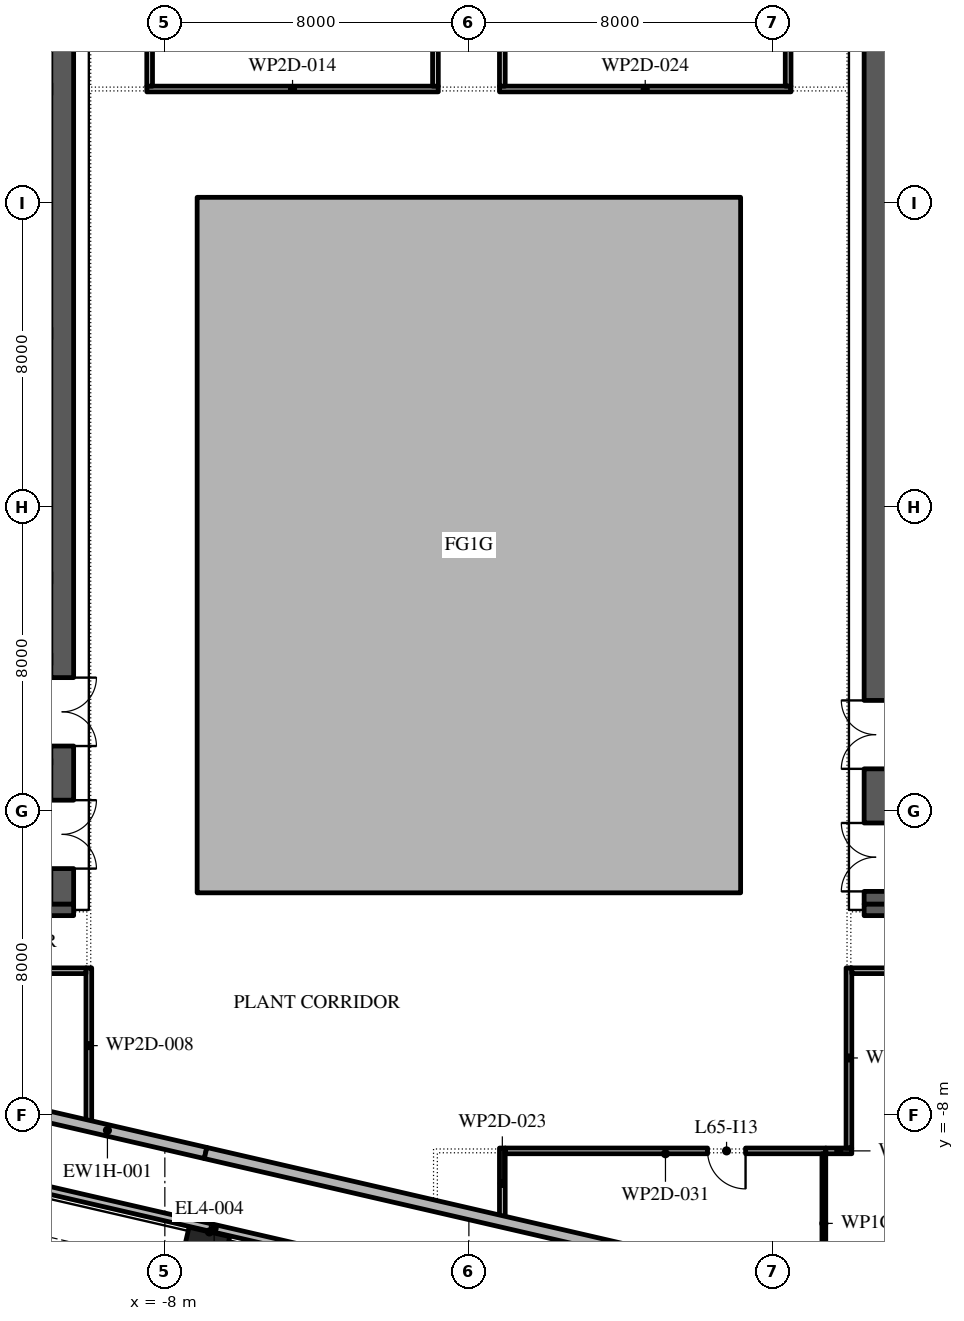
"""IFC4 building model, lengths in metres.
Left out: names, types, materials, properties, quantities, classifications, styles, units other than length and angle.
Written with IfcOpenShell. Run it as: python <this file> out.ifc"""

import sys

from ifc_helpers import new_model, si_unit, direction, frame, frame_2d, origin, origin_2d, place, context, subcontext, project, spatial, polyline, rectangle, outline, extrude, element, fill, save


model = new_model("IFC4")
c1 = context("Model", 3, precision=1e-05, world=origin(), true_north=direction((0.0, 1.0)))
c2 = subcontext(c1, "Body", "Model", "MODEL_VIEW")
j1 = project(units=[si_unit("LENGTHUNIT", "METRE"), si_unit("PLANEANGLEUNIT", "RADIAN")], contexts=[c1])
p1 = place(None, origin())
s1 = spatial("IfcSite", under=j1, at=p1, CompositionType="ELEMENT")
p2 = place(p1, origin())
s2 = spatial("IfcBuilding", under=s1, at=p2, CompositionType="ELEMENT")
p3 = place(p2, frame((0.0, 0.0, 297.6)))
s3 = spatial("IfcBuildingStorey", under=s2, at=p3, CompositionType="ELEMENT", Elevation=297.6)
p4 = place(p3, frame((-6.951, -11.608, 0.0), z_axis=(0.0, 0.0, 1.0), x_axis=(0.974370064785, -0.224951054344, 0.0)))
e1 = element("IfcColumn", 1, at=p4, inside=s3, PredefinedType="COLUMN", context=c2, shape_type="SweptSolid", body=[
    extrude(rectangle(XDim=1.1, YDim=1.1, at=origin_2d()), origin(), (0.0, 0.0, 1.0), 5.4),
])
p5 = place(p3, origin())
e2 = element("IfcWall", 2, at=p5, inside=s3, PredefinedType="STANDARD", context=c2, shape_type="SweptSolid", body=[
    extrude(outline(polyline([(-7.15, -2.15), (7.15, -2.15), (7.15, 16.15), (-7.15, 16.15), (-7.15, -2.15)]), holes=[polyline([(-7.0, -2.0), (-7.0, 16.0), (7.0, 16.0), (7.0, -2.0), (-7.0, -2.0)])]), origin(), (0.0, 0.0, 1.0), 4.95),
])
p6 = place(p3, frame((-31.919, -5.156, -0.05), z_axis=(0.0, 0.0, 1.0), x_axis=(0.974370681559, -0.224948382787, 0.0)))
e3 = element("IfcWall", 3, at=p6, inside=s3, PredefinedType="STANDARD", context=c2, shape_type="SweptSolid", body=[
    extrude(rectangle(XDim=51.76, YDim=0.2, at=frame_2d((25.88, 0.0))), origin(), (0.0, 0.0, 1.0), 1.1),
])
p7 = place(p3, frame((-10.7, -2.45, 0.0), z_axis=(0.0, 0.0, 1.0), x_axis=(0.0, 1.0, 0.0)))
e4 = element("IfcWall", 4, at=p7, inside=s3, PredefinedType="SHEAR", context=c2, shape_type="SweptSolid", body=[
    extrude(rectangle(XDim=27.9, YDim=0.6, at=frame_2d((13.95, 0.0))), origin(), (0.0, 0.0, 1.0), 4.95),
])
p8 = place(p7, frame((23.65, 0.0, 0.0)))
e5 = element("IfcOpeningElement", 5, at=p8, cuts=e4, PredefinedType="OPENING", context=c2, shape_type="SweptSolid", body=[
    extrude(rectangle(XDim=2.4, YDim=2.1, at=frame_2d((1.2, 1.05))), frame((0.0, 0.31, 0.0), z_axis=(0.0, -1.0, 0.0), x_axis=(1.0, 0.0, 0.0)), (0.0, 0.0, 1.0), 0.62),
])
p9 = place(p7, frame((0.938, 0.0, 0.0)))
e6 = element("IfcOpeningElement", 6, at=p9, cuts=e4, PredefinedType="OPENING", context=c2, shape_type="SweptSolid", body=[
    extrude(rectangle(XDim=1.8, YDim=2.4, at=frame_2d((0.9, 1.2))), frame((0.0, 0.31, 0.0), z_axis=(0.0, -1.0, 0.0), x_axis=(1.0, 0.0, 0.0)), (0.0, 0.0, 1.0), 0.62),
])
p10 = place(p7, frame((4.163, 0.0, 0.0)))
e7 = element("IfcOpeningElement", 7, at=p10, cuts=e4, PredefinedType="OPENING", context=c2, shape_type="SweptSolid", body=[
    extrude(rectangle(XDim=1.8, YDim=2.4, at=frame_2d((0.9, 1.2))), frame((0.0, 0.31, 0.0), z_axis=(0.0, -1.0, 0.0), x_axis=(1.0, 0.0, 0.0)), (0.0, 0.0, 1.0), 0.62),
])
p11 = place(p3, frame((-21.6, -2.6, 0.0), z_axis=(0.0, 0.0, 1.0), x_axis=(1.0, 0.0, 0.0)))
e8 = element("IfcWall", 8, at=p11, inside=s3, PredefinedType="SHEAR", context=c2, shape_type="SweptSolid", body=[
    extrude(rectangle(XDim=11.2, YDim=0.3, at=frame_2d((5.6, 0.0))), origin(), (0.0, 0.0, 1.0), 4.95),
])
p12 = place(p3, frame((10.7, -2.45, 0.0), z_axis=(0.0, 0.0, 1.0), x_axis=(0.0, 1.0, 0.0)))
e9 = element("IfcWall", 9, at=p12, inside=s3, PredefinedType="SHEAR", context=c2, shape_type="SweptSolid", body=[
    extrude(rectangle(XDim=27.9, YDim=0.6, at=frame_2d((13.95, 0.0))), origin(), (0.0, 0.0, 1.0), 4.95),
])
p13 = place(p12, frame((23.65, 0.0, 0.0)))
e10 = element("IfcOpeningElement", 10, at=p13, cuts=e9, PredefinedType="OPENING", context=c2, shape_type="SweptSolid", body=[
    extrude(rectangle(XDim=2.4, YDim=2.1, at=frame_2d((1.2, 1.05))), frame((0.0, 0.31, 0.0), z_axis=(0.0, -1.0, 0.0), x_axis=(1.0, 0.0, 0.0)), (0.0, 0.0, 1.0), 0.62),
])
p14 = place(p12, frame((0.337, 0.0, 0.0)))
e11 = element("IfcOpeningElement", 11, at=p14, cuts=e9, PredefinedType="OPENING", context=c2, shape_type="SweptSolid", body=[
    extrude(rectangle(XDim=1.8, YDim=2.4, at=frame_2d((0.9, 1.2))), frame((0.0, 0.31, 0.0), z_axis=(0.0, -1.0, 0.0), x_axis=(1.0, 0.0, 0.0)), (0.0, 0.0, 1.0), 0.62),
])
p15 = place(p12, frame((3.562, 0.0, 0.0)))
e12 = element("IfcOpeningElement", 12, at=p15, cuts=e9, PredefinedType="OPENING", context=c2, shape_type="SweptSolid", body=[
    extrude(rectangle(XDim=1.8, YDim=2.4, at=frame_2d((0.9, 1.2))), frame((0.0, 0.31, 0.0), z_axis=(0.0, -1.0, 0.0), x_axis=(1.0, 0.0, 0.0)), (0.0, 0.0, 1.0), 0.62),
])
p16 = place(p3, frame((10.4, -2.6, 0.0), z_axis=(0.0, 0.0, 1.0), x_axis=(1.0, 0.0, 0.0)))
e13 = element("IfcWall", 13, at=p16, inside=s3, PredefinedType="SHEAR", context=c2, shape_type="SweptSolid", body=[
    extrude(rectangle(XDim=11.2, YDim=0.3, at=frame_2d((5.6, 0.0))), origin(), (0.0, 0.0, 1.0), 4.95),
])
p17 = place(p3, frame((-10.0, -8.216, 0.0), z_axis=(0.0, 0.0, 1.0), x_axis=(0.0, 1.0, 0.0)))
e14 = element("IfcWall", 14, at=p17, inside=s3, PredefinedType="PARTITIONING", context=c2, shape_type="SweptSolid", body=[
    extrude(rectangle(XDim=4.091, YDim=0.15, at=frame_2d((2.045, 0.0))), origin(), (0.0, 0.0, 1.0), 4.95),
])
p18 = place(p3, frame((-10.075, -4.2, 0.0), z_axis=(0.0, 0.0, 1.0), x_axis=(-1.0, 0.0, 0.0)))
e15 = element("IfcWall", 15, at=p18, inside=s3, PredefinedType="PARTITIONING", context=c2, shape_type="SweptSolid", body=[
    extrude(rectangle(XDim=13.45, YDim=0.15, at=frame_2d((6.725, 0.0))), origin(), (0.0, 0.0, 1.0), 4.95),
])
p19 = place(p18, frame((7.625, 0.0, 0.0)))
e16 = element("IfcOpeningElement", 16, at=p19, cuts=e15, PredefinedType="OPENING", context=c2, shape_type="SweptSolid", body=[
    extrude(rectangle(XDim=1.0, YDim=2.1, at=frame_2d((0.5, 1.05))), frame((0.0, 0.085, 0.0), z_axis=(0.0, -1.0, 0.0), x_axis=(1.0, 0.0, 0.0)), (0.0, 0.0, 1.0), 0.17),
])
p20 = place(p3, frame((-8.475, 19.0, 0.0), z_axis=(0.0, 0.0, 1.0), x_axis=(1.0, 0.0, 0.0)))
e17 = element("IfcWall", 17, at=p20, inside=s3, PredefinedType="PARTITIONING", context=c2, shape_type="SweptSolid", body=[
    extrude(rectangle(XDim=7.67, YDim=0.15, at=frame_2d((3.835, 0.0))), origin(), (0.0, 0.0, 1.0), 4.95),
])
p21 = place(p3, frame((-8.4, 29.95, 0.0), z_axis=(0.0, 0.0, 1.0), x_axis=(0.0, -1.0, 0.0)))
e18 = element("IfcWall", 18, at=p21, inside=s3, PredefinedType="PARTITIONING", context=c2, shape_type="SweptSolid", body=[
    extrude(rectangle(XDim=10.875, YDim=0.15, at=frame_2d((5.438, 0.0))), origin(), (0.0, 0.0, 1.0), 4.95),
])
p22 = place(p21, frame((5.05, 0.0, 0.0)))
e19 = element("IfcOpeningElement", 19, at=p22, cuts=e18, PredefinedType="OPENING", context=c2, shape_type="SweptSolid", body=[
    extrude(rectangle(XDim=1.0, YDim=2.1, at=frame_2d((0.5, 1.05))), frame((0.0, 0.085, 0.0), z_axis=(0.0, -1.0, 0.0), x_axis=(1.0, 0.0, 0.0)), (0.0, 0.0, 1.0), 0.17),
])
p23 = place(p3, frame((-0.88, 19.075, 0.0), z_axis=(0.0, 0.0, 1.0), x_axis=(0.0, 1.0, 0.0)))
e20 = element("IfcWall", 20, at=p23, inside=s3, PredefinedType="PARTITIONING", context=c2, shape_type="SweptSolid", body=[
    extrude(rectangle(XDim=10.925, YDim=0.15, at=frame_2d((5.462, 0.0))), origin(), (0.0, 0.0, 1.0), 4.95),
])
p24 = place(p3, frame((0.88, -8.865, 0.0), z_axis=(0.0, 0.0, 1.0), x_axis=(0.0, -1.0, 0.0)))
e21 = element("IfcWall", 21, at=p24, inside=s3, PredefinedType="PARTITIONING", context=c2, shape_type="SweptSolid", body=[
    extrude(rectangle(XDim=1.863, YDim=0.15, at=frame_2d((0.932, 0.0))), origin(), (0.0, 0.0, 1.0), 4.95),
])
p25 = place(p3, frame((0.805, 19.0, 0.0), z_axis=(0.0, 0.0, 1.0), x_axis=(1.0, 0.0, 0.0)))
e22 = element("IfcWall", 22, at=p25, inside=s3, PredefinedType="PARTITIONING", context=c2, shape_type="SweptSolid", body=[
    extrude(rectangle(XDim=7.67, YDim=0.15, at=frame_2d((3.835, 0.0))), origin(), (0.0, 0.0, 1.0), 4.95),
])
p26 = place(p3, frame((0.88, 28.14, 0.0), z_axis=(0.0, 0.0, 1.0), x_axis=(0.0, -1.0, 0.0)))
e23 = element("IfcWall", 23, at=p26, inside=s3, PredefinedType="PARTITIONING", context=c2, shape_type="SweptSolid", body=[
    extrude(rectangle(XDim=9.065, YDim=0.15, at=frame_2d((4.532, 0.0))), origin(), (0.0, 0.0, 1.0), 4.95),
])
p27 = place(p3, frame((8.4, 19.075, 0.0), z_axis=(0.0, 0.0, 1.0), x_axis=(0.0, 1.0, 0.0)))
e24 = element("IfcWall", 24, at=p27, inside=s3, PredefinedType="PARTITIONING", context=c2, shape_type="SweptSolid", body=[
    extrude(rectangle(XDim=9.015, YDim=0.15, at=frame_2d((4.508, 0.0))), origin(), (0.0, 0.0, 1.0), 4.95),
])
p28 = place(p27, frame((5.915, 0.0, 0.0)))
e25 = element("IfcOpeningElement", 25, at=p28, cuts=e24, PredefinedType="OPENING", context=c2, shape_type="SweptSolid", body=[
    extrude(rectangle(XDim=1.0, YDim=2.1, at=frame_2d((0.5, 1.05))), frame((0.0, 0.085, 0.0), z_axis=(0.0, -1.0, 0.0), x_axis=(1.0, 0.0, 0.0)), (0.0, 0.0, 1.0), 0.17),
])
p29 = place(p3, frame((9.39, -8.94, 0.0), z_axis=(0.0, 0.0, 1.0), x_axis=(-1.0, 0.0, 0.0)))
e26 = element("IfcWall", 26, at=p29, inside=s3, PredefinedType="PARTITIONING", context=c2, shape_type="SweptSolid", body=[
    extrude(rectangle(XDim=8.435, YDim=0.15, at=frame_2d((4.217, 0.0))), origin(), (0.0, 0.0, 1.0), 4.95),
])
p30 = place(p29, frame((2.11, 0.0, 0.0)))
e27 = element("IfcOpeningElement", 27, at=p30, cuts=e26, PredefinedType="OPENING", context=c2, shape_type="SweptSolid", body=[
    extrude(rectangle(XDim=1.0, YDim=2.1, at=frame_2d((0.5, 1.05))), frame((0.0, 0.085, 0.0), z_axis=(0.0, -1.0, 0.0), x_axis=(1.0, 0.0, 0.0)), (0.0, 0.0, 1.0), 0.17),
])
p31 = place(p3, frame((9.34, -9.015, 0.0), z_axis=(0.0, 0.0, 1.0), x_axis=(0.0, -1.0, 0.0)))
e28 = element("IfcWall", 28, at=p31, inside=s3, PredefinedType="PARTITIONING", context=c2, shape_type="SweptSolid", body=[
    extrude(rectangle(XDim=3.666, YDim=0.1, at=frame_2d((1.833, 0.0))), origin(), (0.0, 0.0, 1.0), 4.95),
])
p32 = place(p3, frame((10.075, -8.94, 0.0), z_axis=(0.0, 0.0, 1.0), x_axis=(-1.0, 0.0, 0.0)))
e29 = element("IfcWall", 29, at=p32, inside=s3, PredefinedType="PARTITIONING", context=c2, shape_type="SweptSolid", body=[
    extrude(rectangle(XDim=0.685, YDim=0.15, at=frame_2d((0.343, 0.0))), origin(), (0.0, 0.0, 1.0), 4.95),
])
p33 = place(p3, frame((10.0, -4.125, 0.0), z_axis=(0.0, 0.0, 1.0), x_axis=(0.0, -1.0, 0.0)))
e30 = element("IfcWall", 30, at=p33, inside=s3, PredefinedType="PARTITIONING", context=c2, shape_type="SweptSolid", body=[
    extrude(rectangle(XDim=4.74, YDim=0.15, at=frame_2d((2.37, 0.0))), origin(), (0.0, 0.0, 1.0), 4.95),
])
p34 = place(p3, frame((23.014, -4.2, 0.0), z_axis=(0.0, 0.0, 1.0), x_axis=(-1.0, 0.0, 0.0)))
e31 = element("IfcWall", 31, at=p34, inside=s3, PredefinedType="PARTITIONING", context=c2, shape_type="SweptSolid", body=[
    extrude(rectangle(XDim=12.939, YDim=0.15, at=frame_2d((6.469, 0.0))), origin(), (0.0, 0.0, 1.0), 4.95),
])
p35 = place(p34, frame((7.114, 0.0, 0.0)))
e32 = element("IfcOpeningElement", 32, at=p35, cuts=e31, PredefinedType="OPENING", context=c2, shape_type="SweptSolid", body=[
    extrude(rectangle(XDim=1.0, YDim=2.1, at=frame_2d((0.5, 1.05))), frame((0.0, 0.085, 0.0), z_axis=(0.0, -1.0, 0.0), x_axis=(1.0, 0.0, 0.0)), (0.0, 0.0, 1.0), 0.17),
])
p36 = place(p3, frame((-12.093, -7.804, 0.0), z_axis=(0.0, 0.0, 1.0), x_axis=(0.974367901354, -0.224960424989, 0.0)))
e33 = element("IfcWall", 33, at=p36, inside=s3, PredefinedType="STANDARD", context=c2, shape_type="SweptSolid", body=[
    extrude(rectangle(XDim=5.3, YDim=0.3, at=frame_2d((2.65, 0.0))), origin(), (0.0, 0.0, 1.0), 4.05),
])
p37 = place(p3, frame((-6.928, -8.996, 0.0), z_axis=(0.0, 0.0, 1.0), x_axis=(0.974370214698, -0.224950404997, 0.0)))
e34 = element("IfcWall", 34, at=p37, inside=s3, PredefinedType="STANDARD", context=c2, shape_type="SweptSolid", body=[
    extrude(rectangle(XDim=24.716, YDim=0.3, at=frame_2d((12.358, 0.0))), origin(), (0.0, 0.0, 1.0), 4.95),
])
p38 = place(p30, origin())
e35 = element("IfcDoor", 35, at=p38, inside=s3, OperationType="SINGLE_SWING_RIGHT", PredefinedType="DOOR", context=c2, shape_type="SweptSolid", body=[
    extrude(rectangle(XDim=1.0, YDim=2.1, at=frame_2d((0.5, 1.05))), frame((0.0, 0.025, 0.0), z_axis=(0.0, -1.0, 0.0), x_axis=(1.0, 0.0, 0.0)), (0.0, 0.0, 1.0), 0.05),
])
fill(e27, e35)
save(model, sys.argv[1])
